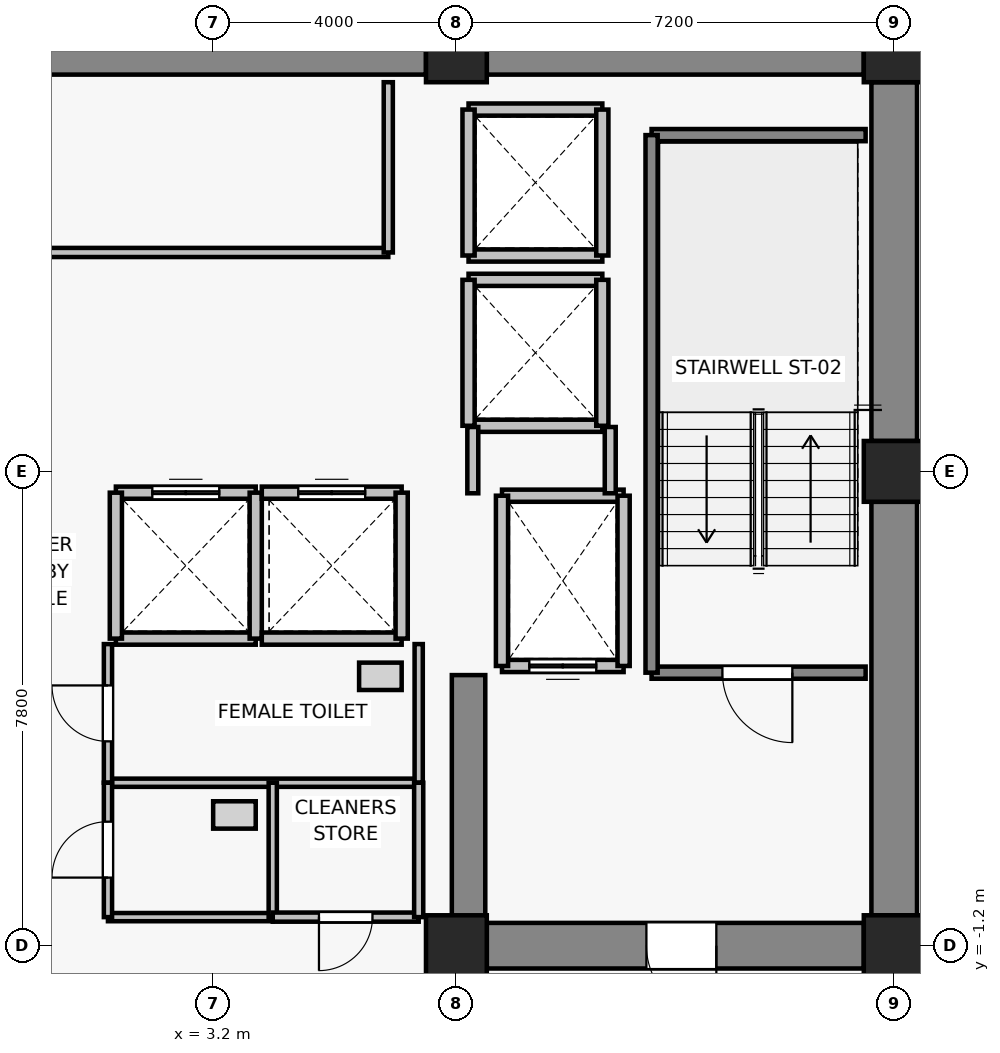
"""IFC4 building model, lengths in metres.
Left out: names, types, materials, properties, quantities, classifications, styles, units other than length and angle.
Written with IfcOpenShell. Run it as: python <this file> out.ifc"""

import sys

from ifc_helpers import new_model, si_unit, direction, frame, frame_2d, origin, origin_2d, place, context, subcontext, project, spatial, rectangle, extrude, source, transform, mapped, element, fill, save


model = new_model("IFC4")
c1 = context("Model", 3, precision=1e-05, world=origin(), true_north=direction((0.0, 1.0)))
c2 = subcontext(c1, "Body", "Model", "MODEL_VIEW")
j1 = project(units=[si_unit("LENGTHUNIT", "METRE"), si_unit("PLANEANGLEUNIT", "RADIAN")], contexts=[c1])
p1 = place(None, origin())
s1 = spatial("IfcSite", under=j1, at=p1, CompositionType="ELEMENT")
p2 = place(p1, origin())
s2 = spatial("IfcBuilding", under=s1, at=p2, CompositionType="ELEMENT")
p3 = place(p2, frame((0.0, 0.0, 146.2)))
s3 = spatial("IfcBuildingStorey", under=s2, at=p3, CompositionType="ELEMENT", Elevation=146.2)
for number, where, z_axis, x_axis in (
    (1, (7.2, -1.2, 0.0), (0.0, 0.0, 1.0), (1.0, 0.0, 0.0)),
    (2, (14.4, -1.2, 0.0), (0.0, 0.0, 1.0), (1.0, 0.0, 0.0)),
    (3, (14.4, 6.6, 0.0), (0.0, 0.0, 1.0), (1.0, 0.0, 0.0)),
    (4, (7.2, 13.5, 0.0), (0.0, 0.0, 1.0), (1.0, 0.0, 0.0)),
    (5, (14.4, 13.5, 0.0), (0.0, 0.0, 1.0), (1.0, 0.0, 0.0)),
):
    element("IfcColumn", number, at=place(p3, frame(where, z_axis=z_axis, x_axis=x_axis)), inside=s3, PredefinedType="COLUMN", context=c2, shape_type="SweptSolid", body=[
        extrude(rectangle(XDim=1.0, YDim=1.0, at=origin_2d()), origin(), (0.0, 0.0, 1.0), 3.3),
    ])
p4 = place(p3, frame((-6.7, 13.5, 0.0), z_axis=(0.0, 0.0, 1.0), x_axis=(1.0, 0.0, 0.0)))
e6 = element("IfcWall", 6, at=p4, inside=s3, PredefinedType="SHEAR", context=c2, shape_type="SweptSolid", body=[
    extrude(rectangle(XDim=13.4, YDim=0.75, at=frame_2d((6.7, 0.0))), origin(), (0.0, 0.0, 1.0), 3.075),
])
p5 = place(p3, frame((7.7, 13.5, 0.0), z_axis=(0.0, 0.0, 1.0), x_axis=(1.0, 0.0, 0.0)))
e7 = element("IfcWall", 7, at=p5, inside=s3, PredefinedType="SHEAR", context=c2, shape_type="SweptSolid", body=[
    extrude(rectangle(XDim=6.2, YDim=0.75, at=frame_2d((3.1, 0.0))), origin(), (0.0, 0.0, 1.0), 3.075),
])
p6 = place(p3, frame((14.4, -0.7, 0.0), z_axis=(0.0, 0.0, 1.0), x_axis=(0.0, 1.0, 0.0)))
e8 = element("IfcWall", 8, at=p6, inside=s3, PredefinedType="SHEAR", context=c2, shape_type="SweptSolid", body=[
    extrude(rectangle(XDim=6.8, YDim=0.75, at=frame_2d((3.4, 0.0))), origin(), (0.0, 0.0, 1.0), 3.075),
])
p7 = place(p3, frame((14.4, 7.1, 0.0), z_axis=(0.0, 0.0, 1.0), x_axis=(0.0, 1.0, 0.0)))
e9 = element("IfcWall", 9, at=p7, inside=s3, PredefinedType="SHEAR", context=c2, shape_type="SweptSolid", body=[
    extrude(rectangle(XDim=5.9, YDim=0.75, at=frame_2d((2.95, 0.0))), origin(), (0.0, 0.0, 1.0), 3.075),
])
p8 = place(p3, frame((13.9, -1.2, 0.0), z_axis=(0.0, 0.0, 1.0), x_axis=(-1.0, 0.0, 0.0)))
e10 = element("IfcWall", 10, at=p8, inside=s3, PredefinedType="SHEAR", context=c2, shape_type="SweptSolid", body=[
    extrude(rectangle(XDim=6.2, YDim=0.75, at=frame_2d((3.1, 0.0))), origin(), (0.0, 0.0, 1.0), 3.075),
])
p9 = place(p8, frame((2.425, 0.0, 0.0)))
e11 = element("IfcOpeningElement", 11, at=p9, cuts=e10, PredefinedType="OPENING", context=c2, shape_type="SweptSolid", body=[
    extrude(rectangle(XDim=1.15, YDim=2.15, at=frame_2d((0.575, 1.075))), frame((0.0, 0.385, 0.0), z_axis=(0.0, -1.0, 0.0), x_axis=(1.0, 0.0, 0.0)), (0.0, 0.0, 1.0), 0.77),
])
p10 = place(p3, frame((7.4, -0.825, 0.0), z_axis=(0.0, 0.0, 1.0), x_axis=(0.0, 1.0, 0.0)))
e12 = element("IfcWall", 12, at=p10, inside=s3, PredefinedType="SHEAR", context=c2, shape_type="SweptSolid", body=[
    extrude(rectangle(XDim=4.075, YDim=0.55, at=frame_2d((2.038, 0.0))), origin(), (0.0, 0.0, 1.0), 3.075),
])
p11 = place(p3, frame((9.95, 3.4, 0.0), z_axis=(0.0, 0.0, 1.0), x_axis=(-1.0, 0.0, 0.0)))
e13 = element("IfcWall", 13, at=p11, inside=s3, PredefinedType="SOLIDWALL", context=c2, shape_type="SweptSolid", body=[
    extrude(rectangle(XDim=2.0, YDim=0.2, at=frame_2d((1.0, 0.0))), origin(), (0.0, 0.0, 1.0), 3.075),
])
p12 = place(p11, frame((0.45, 0.0, 0.0)))
e14 = element("IfcOpeningElement", 14, at=p12, cuts=e13, PredefinedType="OPENING", context=c2, shape_type="SweptSolid", body=[
    extrude(rectangle(XDim=1.1, YDim=2.2, at=frame_2d((0.55, 1.1))), frame((0.0, 0.11, 0.0), z_axis=(0.0, -1.0, 0.0), x_axis=(1.0, 0.0, 0.0)), (0.0, 0.0, 1.0), 0.22),
])
p13 = place(p3, frame((7.95, 6.2, 0.0), z_axis=(0.0, 0.0, 1.0), x_axis=(1.0, 0.0, 0.0)))
e15 = element("IfcWall", 15, at=p13, inside=s3, PredefinedType="SOLIDWALL", context=c2, shape_type="SweptSolid", body=[
    extrude(rectangle(XDim=2.0, YDim=0.2, at=frame_2d((1.0, 0.0))), origin(), (0.0, 0.0, 1.0), 3.075),
])
for number, where, z_axis, x_axis in (
    (16, (7.95, 3.4, 0.0), (0.0, 0.0, 1.0), (0.0, 1.0, 0.0)),
    (17, (9.95, 6.2, 0.0), (0.0, 0.0, 1.0), (0.0, -1.0, 0.0)),
):
    element("IfcWall", number, at=place(p3, frame(where, z_axis=z_axis, x_axis=x_axis)), inside=s3, PredefinedType="SOLIDWALL", context=c2, shape_type="SweptSolid", body=[
        extrude(rectangle(XDim=2.8, YDim=0.2, at=frame_2d((1.4, 0.0))), origin(), (0.0, 0.0, 1.0), 3.075),
    ])
p14 = place(p3, frame((3.9, 3.85, 0.0), z_axis=(0.0, 0.0, 1.0), x_axis=(-1.0, 0.0, 0.0)))
e18 = element("IfcWall", 18, at=p14, inside=s3, PredefinedType="SOLIDWALL", context=c2, shape_type="SweptSolid", body=[
    extrude(rectangle(XDim=2.3, YDim=0.2, at=frame_2d((1.15, 0.0))), origin(), (0.0, 0.0, 1.0), 3.075),
])
p15 = place(p3, frame((1.6, 6.25, 0.0), z_axis=(0.0, 0.0, 1.0), x_axis=(1.0, 0.0, 0.0)))
e19 = element("IfcWall", 19, at=p15, inside=s3, PredefinedType="SOLIDWALL", context=c2, shape_type="SweptSolid", body=[
    extrude(rectangle(XDim=2.3, YDim=0.2, at=frame_2d((1.15, 0.0))), origin(), (0.0, 0.0, 1.0), 3.075),
])
p16 = place(p15, frame((0.6, 0.0, 0.0)))
e20 = element("IfcOpeningElement", 20, at=p16, cuts=e19, PredefinedType="OPENING", context=c2, shape_type="SweptSolid", body=[
    extrude(rectangle(XDim=1.1, YDim=2.2, at=frame_2d((0.55, 1.1))), frame((0.0, 0.11, 0.0), z_axis=(0.0, -1.0, 0.0), x_axis=(1.0, 0.0, 0.0)), (0.0, 0.0, 1.0), 0.22),
])
for number, where, z_axis, x_axis in (
    (21, (1.6, 3.85, 0.0), (0.0, 0.0, 1.0), (0.0, 1.0, 0.0)),
    (22, (3.9, 6.25, 0.0), (0.0, 0.0, 1.0), (0.0, -1.0, 0.0)),
):
    element("IfcWall", number, at=place(p3, frame(where, z_axis=z_axis, x_axis=x_axis)), inside=s3, PredefinedType="SOLIDWALL", context=c2, shape_type="SweptSolid", body=[
        extrude(rectangle(XDim=2.4, YDim=0.2, at=frame_2d((1.2, 0.0))), origin(), (0.0, 0.0, 1.0), 3.075),
    ])
p17 = place(p3, frame((6.3, 3.85, 0.0), z_axis=(0.0, 0.0, 1.0), x_axis=(-1.0, 0.0, 0.0)))
e23 = element("IfcWall", 23, at=p17, inside=s3, PredefinedType="SOLIDWALL", context=c2, shape_type="SweptSolid", body=[
    extrude(rectangle(XDim=2.3, YDim=0.2, at=frame_2d((1.15, 0.0))), origin(), (0.0, 0.0, 1.0), 3.075),
])
p18 = place(p3, frame((4.0, 6.25, 0.0), z_axis=(0.0, 0.0, 1.0), x_axis=(1.0, 0.0, 0.0)))
e24 = element("IfcWall", 24, at=p18, inside=s3, PredefinedType="SOLIDWALL", context=c2, shape_type="SweptSolid", body=[
    extrude(rectangle(XDim=2.3, YDim=0.2, at=frame_2d((1.15, 0.0))), origin(), (0.0, 0.0, 1.0), 3.075),
])
p19 = place(p18, frame((0.6, 0.0, 0.0)))
e25 = element("IfcOpeningElement", 25, at=p19, cuts=e24, PredefinedType="OPENING", context=c2, shape_type="SweptSolid", body=[
    extrude(rectangle(XDim=1.1, YDim=2.2, at=frame_2d((0.55, 1.1))), frame((0.0, 0.11, 0.0), z_axis=(0.0, -1.0, 0.0), x_axis=(1.0, 0.0, 0.0)), (0.0, 0.0, 1.0), 0.22),
])
p20 = place(p3, frame((6.3, 6.25, 0.0), z_axis=(0.0, 0.0, 1.0), x_axis=(0.0, -1.0, 0.0)))
e26 = element("IfcWall", 26, at=p20, inside=s3, PredefinedType="SOLIDWALL", context=c2, shape_type="SweptSolid", body=[
    extrude(rectangle(XDim=2.4, YDim=0.2, at=frame_2d((1.2, 0.0))), origin(), (0.0, 0.0, 1.0), 3.075),
])
for number, where, z_axis, x_axis in (
    (27, (9.6, 7.35, 0.0), (0.0, 0.0, 1.0), (-1.0, 0.0, 0.0)),
    (28, (7.4, 9.75, 0.0), (0.0, 0.0, 1.0), (1.0, 0.0, 0.0)),
):
    element("IfcWall", number, at=place(p3, frame(where, z_axis=z_axis, x_axis=x_axis)), inside=s3, PredefinedType="SOLIDWALL", context=c2, shape_type="SweptSolid", body=[
        extrude(rectangle(XDim=2.2, YDim=0.2, at=frame_2d((1.1, 0.0))), origin(), (0.0, 0.0, 1.0), 2.565),
    ])
p21 = place(p3, frame((7.4, 7.35, 0.0), z_axis=(0.0, 0.0, 1.0), x_axis=(0.0, 1.0, 0.0)))
e29 = element("IfcWall", 29, at=p21, inside=s3, PredefinedType="SOLIDWALL", context=c2, shape_type="SweptSolid", body=[
    extrude(rectangle(XDim=2.4, YDim=0.2, at=frame_2d((1.2, 0.0))), origin(), (0.0, 0.0, 1.0), 2.565),
])
p22 = place(p3, frame((9.6, 9.75, 0.0), z_axis=(0.0, 0.0, 1.0), x_axis=(0.0, -1.0, 0.0)))
e30 = element("IfcWall", 30, at=p22, inside=s3, PredefinedType="SOLIDWALL", context=c2, shape_type="SweptSolid", body=[
    extrude(rectangle(XDim=2.4, YDim=0.2, at=frame_2d((1.2, 0.0))), origin(), (0.0, 0.0, 1.0), 3.075),
])
for number, where, z_axis, x_axis in (
    (31, (9.6, 10.15, 0.0), (0.0, 0.0, 1.0), (-1.0, 0.0, 0.0)),
    (32, (7.4, 12.55, 0.0), (0.0, 0.0, 1.0), (1.0, 0.0, 0.0)),
):
    element("IfcWall", number, at=place(p3, frame(where, z_axis=z_axis, x_axis=x_axis)), inside=s3, PredefinedType="SOLIDWALL", context=c2, shape_type="SweptSolid", body=[
        extrude(rectangle(XDim=2.2, YDim=0.2, at=frame_2d((1.1, 0.0))), origin(), (0.0, 0.0, 1.0), 2.565),
    ])
p23 = place(p3, frame((7.4, 10.15, 0.0), z_axis=(0.0, 0.0, 1.0), x_axis=(0.0, 1.0, 0.0)))
e33 = element("IfcWall", 33, at=p23, inside=s3, PredefinedType="SOLIDWALL", context=c2, shape_type="SweptSolid", body=[
    extrude(rectangle(XDim=2.4, YDim=0.2, at=frame_2d((1.2, 0.0))), origin(), (0.0, 0.0, 1.0), 2.565),
])
p24 = place(p3, frame((9.6, 12.55, 0.0), z_axis=(0.0, 0.0, 1.0), x_axis=(0.0, -1.0, 0.0)))
e34 = element("IfcWall", 34, at=p24, inside=s3, PredefinedType="SOLIDWALL", context=c2, shape_type="SweptSolid", body=[
    extrude(rectangle(XDim=2.4, YDim=0.2, at=frame_2d((1.2, 0.0))), origin(), (0.0, 0.0, 1.0), 3.075),
])
p25 = place(p3, frame((13.93, 3.29, 0.0), z_axis=(0.0, 0.0, 1.0), x_axis=(-1.0, 0.0, 0.0)))
e35 = element("IfcWall", 35, at=p25, inside=s3, PredefinedType="SOLIDWALL", context=c2, shape_type="SweptSolid", body=[
    extrude(rectangle(XDim=3.52, YDim=0.2, at=frame_2d((1.76, 0.0))), origin(), (0.0, 0.0, 1.0), 3.075),
])
p26 = place(p25, frame((1.205, 0.0, 0.0)))
e36 = element("IfcOpeningElement", 36, at=p26, cuts=e35, PredefinedType="OPENING", context=c2, shape_type="SweptSolid", body=[
    extrude(rectangle(XDim=1.15, YDim=2.15, at=frame_2d((0.575, 1.075))), frame((0.0, 0.11, 0.0), z_axis=(0.0, -1.0, 0.0), x_axis=(1.0, 0.0, 0.0)), (0.0, 0.0, 1.0), 0.22),
])
p27 = place(p3, frame((10.41, 12.13, 0.0), z_axis=(0.0, 0.0, 1.0), x_axis=(1.0, 0.0, 0.0)))
e37 = element("IfcWall", 37, at=p27, inside=s3, PredefinedType="SOLIDWALL", context=c2, shape_type="SweptSolid", body=[
    extrude(rectangle(XDim=3.52, YDim=0.2, at=frame_2d((1.76, 0.0))), origin(), (0.0, 0.0, 1.0), 3.075),
])
p28 = place(p3, frame((10.41, 3.29, 0.0), z_axis=(0.0, 0.0, 1.0), x_axis=(0.0, 1.0, 0.0)))
e38 = element("IfcWall", 38, at=p28, inside=s3, PredefinedType="SOLIDWALL", context=c2, shape_type="SweptSolid", body=[
    extrude(rectangle(XDim=8.84, YDim=0.2, at=frame_2d((4.42, 0.0))), origin(), (0.0, 0.0, 1.0), 3.075),
])
p29 = place(p3, frame((7.47, 6.24, 0.0), z_axis=(0.0, 0.0, 1.0), x_axis=(0.0, 1.0, 0.0)))
e39 = element("IfcWall", 39, at=p29, inside=s3, PredefinedType="PARTITIONING", context=c2, shape_type="SweptSolid", body=[
    extrude(rectangle(XDim=1.09, YDim=0.18, at=frame_2d((0.545, 0.0))), origin(), (0.0, 0.0, 1.0), 2.565),
])
p30 = place(p3, frame((9.73, 7.33, 0.0), z_axis=(0.0, 0.0, 1.0), x_axis=(0.0, -1.0, 0.0)))
e40 = element("IfcWall", 40, at=p30, inside=s3, PredefinedType="PARTITIONING", context=c2, shape_type="SweptSolid", body=[
    extrude(rectangle(XDim=1.09, YDim=0.18, at=frame_2d((0.545, 0.0))), origin(), (0.0, 0.0, 1.0), 3.075),
])
p31 = place(p3, frame((6.08, 10.2, 0.0), z_axis=(0.0, 0.0, 1.0), x_axis=(-1.0, 0.0, 0.0)))
e41 = element("IfcWall", 41, at=p31, inside=s3, PredefinedType="PARTITIONING", context=c2, shape_type="SweptSolid", body=[
    extrude(rectangle(XDim=12.16, YDim=0.15, at=frame_2d((6.08, 0.0))), origin(), (0.0, 0.0, 1.0), 3.075),
])
p32 = place(p31, frame((7.005, 0.0, 0.0)))
e42 = element("IfcOpeningElement", 42, at=p32, cuts=e41, PredefinedType="OPENING", context=c2, shape_type="SweptSolid", body=[
    extrude(rectangle(XDim=1.15, YDim=2.15, at=frame_2d((0.575, 1.075))), frame((0.0, 0.085, 0.0), z_axis=(0.0, -1.0, 0.0), x_axis=(1.0, 0.0, 0.0)), (0.0, 0.0, 1.0), 0.17),
])
p33 = place(p3, frame((6.08, 13.0, 0.0), z_axis=(0.0, 0.0, 1.0), x_axis=(0.0, -1.0, 0.0)))
e43 = element("IfcWall", 43, at=p33, inside=s3, PredefinedType="PARTITIONING", context=c2, shape_type="SweptSolid", body=[
    extrude(rectangle(XDim=2.8, YDim=0.15, at=frame_2d((1.4, 0.0))), origin(), (0.0, 0.0, 1.0), 3.075),
])
p34 = place(p3, frame((6.58, 1.48, 0.0), z_axis=(0.0, 0.0, 1.0), x_axis=(-1.0, 0.0, 0.0)))
e44 = element("IfcWall", 44, at=p34, inside=s3, PredefinedType="PARTITIONING", context=c2, shape_type="SweptSolid", body=[
    extrude(rectangle(XDim=5.11, YDim=0.135, at=frame_2d((2.555, 0.0))), origin(), (0.0, 0.0, 1.0), 3.075),
])
p35 = place(p3, frame((1.47, 1.48, 0.0), z_axis=(0.0, 0.0, 1.0), x_axis=(0.0, 1.0, 0.0)))
e45 = element("IfcWall", 45, at=p35, inside=s3, PredefinedType="PARTITIONING", context=c2, shape_type="SweptSolid", body=[
    extrude(rectangle(XDim=2.28, YDim=0.135, at=frame_2d((1.14, 0.0))), origin(), (0.0, 0.0, 1.0), 3.075),
])
p36 = place(p35, frame((0.68, 0.0, 0.0)))
e46 = element("IfcOpeningElement", 46, at=p36, cuts=e45, PredefinedType="OPENING", context=c2, shape_type="SweptSolid", body=[
    extrude(rectangle(XDim=0.92, YDim=2.1, at=frame_2d((0.46, 1.05))), frame((0.0, 0.077, 0.0), z_axis=(0.0, -1.0, 0.0), x_axis=(1.0, 0.0, 0.0)), (0.0, 0.0, 1.0), 0.155),
])
p37 = place(p3, frame((6.58, 3.76, 0.0), z_axis=(0.0, 0.0, 1.0), x_axis=(0.0, -1.0, 0.0)))
e47 = element("IfcWall", 47, at=p37, inside=s3, PredefinedType="PARTITIONING", context=c2, shape_type="SweptSolid", body=[
    extrude(rectangle(XDim=2.28, YDim=0.135, at=frame_2d((1.14, 0.0))), origin(), (0.0, 0.0, 1.0), 3.075),
])
p38 = place(p3, frame((4.18, -0.73, 0.0), z_axis=(0.0, 0.0, 1.0), x_axis=(-1.0, 0.0, 0.0)))
e48 = element("IfcWall", 48, at=p38, inside=s3, PredefinedType="PARTITIONING", context=c2, shape_type="SweptSolid", body=[
    extrude(rectangle(XDim=2.71, YDim=0.135, at=frame_2d((1.355, 0.0))), origin(), (0.0, 0.0, 1.0), 3.075),
])
p39 = place(p3, frame((1.47, -0.73, 0.0), z_axis=(0.0, 0.0, 1.0), x_axis=(0.0, 1.0, 0.0)))
e49 = element("IfcWall", 49, at=p39, inside=s3, PredefinedType="PARTITIONING", context=c2, shape_type="SweptSolid", body=[
    extrude(rectangle(XDim=2.21, YDim=0.135, at=frame_2d((1.105, 0.0))), origin(), (0.0, 0.0, 1.0), 3.075),
])
p40 = place(p39, frame((0.65, 0.0, 0.0)))
e50 = element("IfcOpeningElement", 50, at=p40, cuts=e49, PredefinedType="OPENING", context=c2, shape_type="SweptSolid", body=[
    extrude(rectangle(XDim=0.92, YDim=2.1, at=frame_2d((0.46, 1.05))), frame((0.0, 0.077, 0.0), z_axis=(0.0, -1.0, 0.0), x_axis=(1.0, 0.0, 0.0)), (0.0, 0.0, 1.0), 0.155),
])
p41 = place(p3, frame((4.18, 1.48, 0.0), z_axis=(0.0, 0.0, 1.0), x_axis=(0.0, -1.0, 0.0)))
e51 = element("IfcWall", 51, at=p41, inside=s3, PredefinedType="PARTITIONING", context=c2, shape_type="SweptSolid", body=[
    extrude(rectangle(XDim=2.21, YDim=0.135, at=frame_2d((1.105, 0.0))), origin(), (0.0, 0.0, 1.0), 3.075),
])
p42 = place(p3, frame((6.58, -0.73, 0.0), z_axis=(0.0, 0.0, 1.0), x_axis=(-1.0, 0.0, 0.0)))
e52 = element("IfcWall", 52, at=p42, inside=s3, PredefinedType="PARTITIONING", context=c2, shape_type="SweptSolid", body=[
    extrude(rectangle(XDim=2.4, YDim=0.15, at=frame_2d((1.2, 0.0))), origin(), (0.0, 0.0, 1.0), 3.075),
])
p43 = place(p42, frame((0.76, 0.0, 0.0)))
e53 = element("IfcOpeningElement", 53, at=p43, cuts=e52, PredefinedType="OPENING", context=c2, shape_type="SweptSolid", body=[
    extrude(rectangle(XDim=0.88, YDim=2.1, at=frame_2d((0.44, 1.05))), frame((0.0, 0.085, 0.0), z_axis=(0.0, -1.0, 0.0), x_axis=(1.0, 0.0, 0.0)), (0.0, 0.0, 1.0), 0.17),
])
p44 = place(p3, frame((6.58, 1.48, 0.0), z_axis=(0.0, 0.0, 1.0), x_axis=(0.0, -1.0, 0.0)))
e54 = element("IfcWall", 54, at=p44, inside=s3, PredefinedType="PARTITIONING", context=c2, shape_type="SweptSolid", body=[
    extrude(rectangle(XDim=2.21, YDim=0.15, at=frame_2d((1.105, 0.0))), origin(), (0.0, 0.0, 1.0), 3.075),
])
m1 = source(origin(), c2, "Body", "SweptSolid", [
    extrude(rectangle(XDim=1.1, YDim=2.2, at=frame_2d((0.55, 1.1))), frame((0.0, 0.025, 0.0), z_axis=(0.0, -1.0, 0.0), x_axis=(1.0, 0.0, 0.0)), (0.0, 0.0, 1.0), 0.05),
])
p45 = place(p12, origin())
e55 = element("IfcDoor", 55, at=p45, inside=s3, OperationType="DOUBLE_DOOR_SLIDING", PredefinedType="DOOR", context=c2, shape_type="MappedRepresentation", body=[
    mapped(m1, transform((0.0, 0.0, 0.0), x_axis=(1.0, 0.0, 0.0), y_axis=(0.0, 1.0, 0.0), z_axis=(0.0, 0.0, 1.0), scale=1.0)),
])
fill(e14, e55)
p46 = place(p16, origin())
e56 = element("IfcDoor", 56, at=p46, inside=s3, OperationType="DOUBLE_DOOR_SLIDING", PredefinedType="DOOR", context=c2, shape_type="MappedRepresentation", body=[
    mapped(m1, transform((0.0, 0.0, 0.0), x_axis=(1.0, 0.0, 0.0), y_axis=(0.0, 1.0, 0.0), z_axis=(0.0, 0.0, 1.0), scale=1.0)),
])
fill(e20, e56)
p47 = place(p19, origin())
e57 = element("IfcDoor", 57, at=p47, inside=s3, OperationType="DOUBLE_DOOR_SLIDING", PredefinedType="DOOR", context=c2, shape_type="MappedRepresentation", body=[
    mapped(m1, transform((0.0, 0.0, 0.0), x_axis=(1.0, 0.0, 0.0), y_axis=(0.0, 1.0, 0.0), z_axis=(0.0, 0.0, 1.0), scale=1.0)),
])
fill(e25, e57)
m2 = source(origin(), c2, "Body", "SweptSolid", [
    extrude(rectangle(XDim=1.15, YDim=2.15, at=frame_2d((0.575, 1.075))), frame((0.0, 0.025, 0.0), z_axis=(0.0, -1.0, 0.0), x_axis=(1.0, 0.0, 0.0)), (0.0, 0.0, 1.0), 0.05),
])
p48 = place(p26, origin())
e58 = element("IfcDoor", 58, at=p48, inside=s3, OperationType="SINGLE_SWING_LEFT", PredefinedType="DOOR", context=c2, shape_type="MappedRepresentation", body=[
    mapped(m2, transform((0.0, 0.0, 0.0), x_axis=(1.0, 0.0, 0.0), y_axis=(0.0, 1.0, 0.0), z_axis=(0.0, 0.0, 1.0), scale=1.0)),
])
fill(e36, e58)
p49 = place(p9, origin())
e59 = element("IfcDoor", 59, at=p49, inside=s3, OperationType="SINGLE_SWING_LEFT", PredefinedType="DOOR", context=c2, shape_type="MappedRepresentation", body=[
    mapped(m2, transform((0.0, 0.0, 0.0), x_axis=(1.0, 0.0, 0.0), y_axis=(0.0, 1.0, 0.0), z_axis=(0.0, 0.0, 1.0), scale=1.0)),
])
fill(e11, e59)
m3 = source(origin(), c2, "Body", "SweptSolid", [
    extrude(rectangle(XDim=0.92, YDim=2.1, at=frame_2d((0.46, 1.05))), frame((0.0, 0.025, 0.0), z_axis=(0.0, -1.0, 0.0), x_axis=(1.0, 0.0, 0.0)), (0.0, 0.0, 1.0), 0.05),
])
p50 = place(p36, origin())
e60 = element("IfcDoor", 60, at=p50, inside=s3, OperationType="SINGLE_SWING_RIGHT", PredefinedType="DOOR", context=c2, shape_type="MappedRepresentation", body=[
    mapped(m3, transform((0.0, 0.0, 0.0), x_axis=(1.0, 0.0, 0.0), y_axis=(0.0, 1.0, 0.0), z_axis=(0.0, 0.0, 1.0), scale=1.0)),
])
fill(e46, e60)
p51 = place(p40, origin())
e61 = element("IfcDoor", 61, at=p51, inside=s3, OperationType="SINGLE_SWING_LEFT", PredefinedType="DOOR", context=c2, shape_type="MappedRepresentation", body=[
    mapped(m3, transform((0.0, 0.0, 0.0), x_axis=(1.0, 0.0, 0.0), y_axis=(0.0, 1.0, 0.0), z_axis=(0.0, 0.0, 1.0), scale=1.0)),
])
fill(e50, e61)
m4 = source(origin(), c2, "Body", "SweptSolid", [
    extrude(rectangle(XDim=0.88, YDim=2.1, at=frame_2d((0.44, 1.05))), frame((0.0, 0.025, 0.0), z_axis=(0.0, -1.0, 0.0), x_axis=(1.0, 0.0, 0.0)), (0.0, 0.0, 1.0), 0.05),
])
p52 = place(p43, origin())
e62 = element("IfcDoor", 62, at=p52, inside=s3, OperationType="SINGLE_SWING_RIGHT", PredefinedType="DOOR", context=c2, shape_type="MappedRepresentation", body=[
    mapped(m4, transform((0.0, 0.0, 0.0), x_axis=(1.0, 0.0, 0.0), y_axis=(0.0, 1.0, 0.0), z_axis=(0.0, 0.0, 1.0), scale=1.0)),
])
fill(e53, e62)
save(model, sys.argv[1])
